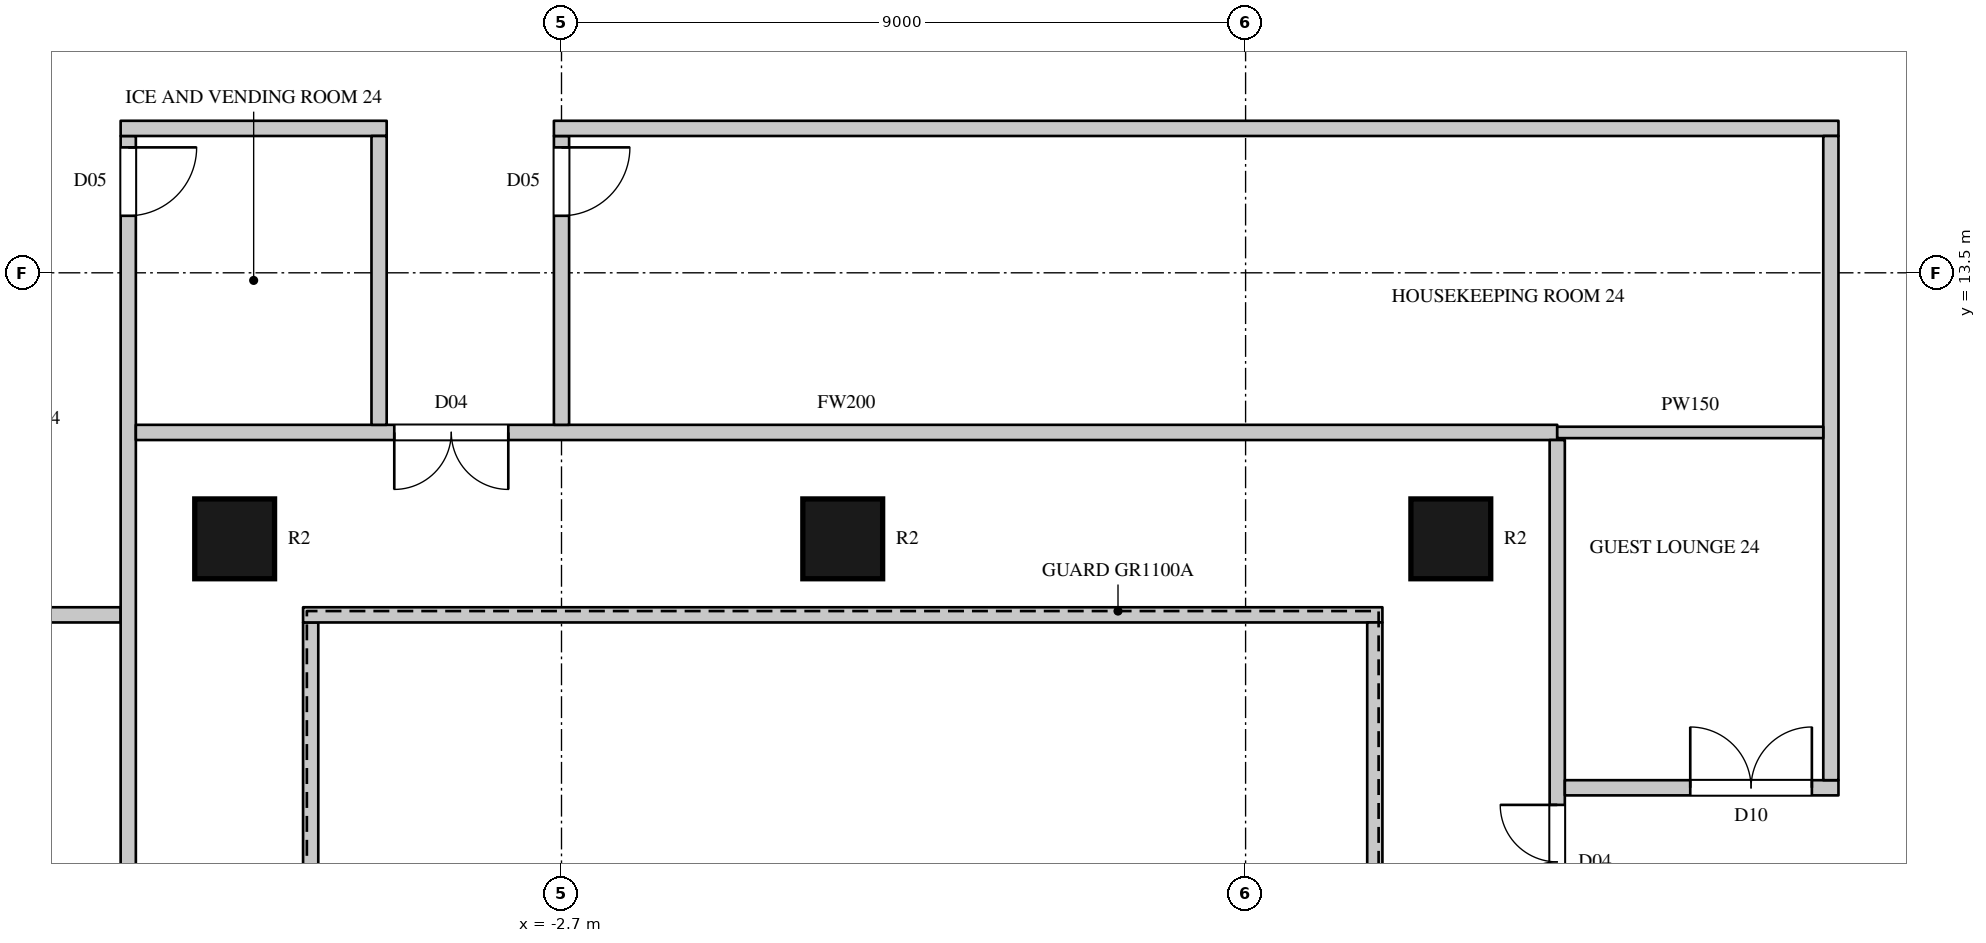
"""IFC4 building model, lengths in metres.
Left out: names, types, materials, properties, quantities, classifications, styles, units other than length and angle.
Written with IfcOpenShell. Run it as: python <this file> out.ifc"""

import sys

from ifc_helpers import new_model, si_unit, direction, frame, frame_2d, origin, origin_2d, place, context, subcontext, project, spatial, rectangle, circle, extrude, element, fill, save


model = new_model("IFC4")
c1 = context("Model", 3, precision=1e-05, world=origin(), true_north=direction((0.0, 1.0)))
c2 = subcontext(c1, "Body", "Model", "MODEL_VIEW")
j1 = project(units=[si_unit("LENGTHUNIT", "METRE"), si_unit("PLANEANGLEUNIT", "RADIAN")], contexts=[c1])
p1 = place(None, origin())
s1 = spatial("IfcSite", under=j1, at=p1, CompositionType="ELEMENT")
p2 = place(p1, origin())
s2 = spatial("IfcBuilding", under=s1, at=p2, CompositionType="ELEMENT")
p3 = place(p2, frame((0.0, 0.0, 116.7)))
s3 = spatial("IfcBuildingStorey", under=s2, at=p3, CompositionType="ELEMENT", Elevation=116.7)
for number, where, z_axis, x_axis in (
    (1, (-7.0, 10.0, 0.0), (0.0, 0.0, 1.0), (1.0, 0.0, 0.0)),
    (2, (1.0, 10.0, 0.0), (0.0, 0.0, 1.0), (1.0, 0.0, 0.0)),
    (3, (9.0, 10.0, 0.0), (0.0, 0.0, 1.0), (1.0, 0.0, 0.0)),
):
    element("IfcColumn", number, at=place(p3, frame(where, z_axis=z_axis, x_axis=x_axis)), inside=s3, PredefinedType="COLUMN", context=c2, shape_type="SweptSolid", body=[
        extrude(circle(Radius=0.525, at=origin_2d()), origin(), (0.0, 0.0, 1.0), 3.6),
    ])
p4 = place(p3, frame((-13.97, 9.0, 0.0), z_axis=(0.0, 0.0, 1.0), x_axis=(1.0, 0.0, 0.0)))
e4 = element("IfcWall", 4, at=p4, inside=s3, PredefinedType="PARTITIONING", context=c2, shape_type="SweptSolid", body=[
    extrude(rectangle(XDim=5.47, YDim=0.2, at=frame_2d((2.735, 0.0))), origin(), (0.0, 0.0, 1.0), 3.3),
])
p5 = place(p3, frame((-8.4, -11.3, 0.0), z_axis=(0.0, 0.0, 1.0), x_axis=(0.0, 1.0, 0.0)))
e5 = element("IfcWall", 5, at=p5, inside=s3, PredefinedType="PARTITIONING", context=c2, shape_type="SweptSolid", body=[
    extrude(rectangle(XDim=26.6, YDim=0.2, at=frame_2d((13.3, 0.0))), origin(), (0.0, 0.0, 1.0), 3.3),
])
p6 = place(p5, frame((15.05, 0.0, 0.0)))
e6 = element("IfcOpeningElement", 6, at=p6, cuts=e5, PredefinedType="OPENING", context=c2, shape_type="SweptSolid", body=[
    extrude(rectangle(XDim=1.5, YDim=2.2, at=frame_2d((0.75, 1.1))), frame((0.0, 0.11, 0.0), z_axis=(0.0, -1.0, 0.0), x_axis=(1.0, 0.0, 0.0)), (0.0, 0.0, 1.0), 0.22),
])
p7 = place(p5, frame((25.55, 0.0, 0.0)))
e7 = element("IfcOpeningElement", 7, at=p7, cuts=e5, PredefinedType="OPENING", context=c2, shape_type="SweptSolid", body=[
    extrude(rectangle(XDim=0.9, YDim=2.2, at=frame_2d((0.45, 1.1))), frame((0.0, 0.11, 0.0), z_axis=(0.0, -1.0, 0.0), x_axis=(1.0, 0.0, 0.0)), (0.0, 0.0, 1.0), 0.22),
])
p8 = place(p3, frame((-8.3, 11.4, 0.0), z_axis=(0.0, 0.0, 1.0), x_axis=(1.0, 0.0, 0.0)))
e8 = element("IfcWall", 8, at=p8, inside=s3, PredefinedType="PARTITIONING", context=c2, shape_type="SweptSolid", body=[
    extrude(rectangle(XDim=18.7, YDim=0.2, at=frame_2d((9.35, 0.0))), origin(), (0.0, 0.0, 1.0), 3.3),
])
p9 = place(p8, frame((3.4, 0.0, 0.0)))
e9 = element("IfcOpeningElement", 9, at=p9, cuts=e8, PredefinedType="OPENING", context=c2, shape_type="SweptSolid", body=[
    extrude(rectangle(XDim=1.5, YDim=2.2, at=frame_2d((0.75, 1.1))), frame((0.0, 0.11, 0.0), z_axis=(0.0, -1.0, 0.0), x_axis=(1.0, 0.0, 0.0)), (0.0, 0.0, 1.0), 0.22),
])
p10 = place(p3, frame((-8.5, 15.4, 0.0), z_axis=(0.0, 0.0, 1.0), x_axis=(1.0, 0.0, 0.0)))
e10 = element("IfcWall", 10, at=p10, inside=s3, PredefinedType="PARTITIONING", context=c2, shape_type="SweptSolid", body=[
    extrude(rectangle(XDim=3.5, YDim=0.2, at=frame_2d((1.75, 0.0))), origin(), (0.0, 0.0, 1.0), 3.3),
])
p11 = place(p3, frame((-6.0, -8.9, 0.0), z_axis=(0.0, 0.0, 1.0), x_axis=(0.0, 1.0, 0.0)))
e11 = element("IfcWall", 11, at=p11, inside=s3, PredefinedType="PARTITIONING", context=c2, shape_type="SweptSolid", body=[
    extrude(rectangle(XDim=17.8, YDim=0.2, at=frame_2d((8.9, 0.0))), origin(), (0.0, 0.0, 1.0), 3.3),
])
p12 = place(p3, frame((-6.1, 9.0, 0.0), z_axis=(0.0, 0.0, 1.0), x_axis=(1.0, 0.0, 0.0)))
e12 = element("IfcWall", 12, at=p12, inside=s3, PredefinedType="PARTITIONING", context=c2, shape_type="SweptSolid", body=[
    extrude(rectangle(XDim=14.2, YDim=0.2, at=frame_2d((7.1, 0.0))), origin(), (0.0, 0.0, 1.0), 3.3),
])
p13 = place(p3, frame((-5.1, 11.5, 0.0), z_axis=(0.0, 0.0, 1.0), x_axis=(0.0, 1.0, 0.0)))
e13 = element("IfcWall", 13, at=p13, inside=s3, PredefinedType="PARTITIONING", context=c2, shape_type="SweptSolid", body=[
    extrude(rectangle(XDim=3.8, YDim=0.2, at=frame_2d((1.9, 0.0))), origin(), (0.0, 0.0, 1.0), 3.3),
])
p14 = place(p3, frame((-2.7, 11.5, 0.0), z_axis=(0.0, 0.0, 1.0), x_axis=(0.0, 1.0, 0.0)))
e14 = element("IfcWall", 14, at=p14, inside=s3, PredefinedType="PARTITIONING", context=c2, shape_type="SweptSolid", body=[
    extrude(rectangle(XDim=3.8, YDim=0.2, at=frame_2d((1.9, 0.0))), origin(), (0.0, 0.0, 1.0), 2.75),
])
p15 = place(p14, frame((2.75, 0.0, 0.0)))
e15 = element("IfcOpeningElement", 15, at=p15, cuts=e14, PredefinedType="OPENING", context=c2, shape_type="SweptSolid", body=[
    extrude(rectangle(XDim=0.9, YDim=2.2, at=frame_2d((0.45, 1.1))), frame((0.0, 0.11, 0.0), z_axis=(0.0, -1.0, 0.0), x_axis=(1.0, 0.0, 0.0)), (0.0, 0.0, 1.0), 0.22),
])
p16 = place(p3, frame((-2.8, 15.4, 0.0), z_axis=(0.0, 0.0, 1.0), x_axis=(1.0, 0.0, 0.0)))
e16 = element("IfcWall", 16, at=p16, inside=s3, PredefinedType="PARTITIONING", context=c2, shape_type="SweptSolid", body=[
    extrude(rectangle(XDim=16.9, YDim=0.2, at=frame_2d((8.45, 0.0))), origin(), (0.0, 0.0, 1.0), 3.3),
])
p17 = place(p3, frame((8.0, -8.9, 0.0), z_axis=(0.0, 0.0, 1.0), x_axis=(0.0, 1.0, 0.0)))
e17 = element("IfcWall", 17, at=p17, inside=s3, PredefinedType="PARTITIONING", context=c2, shape_type="SweptSolid", body=[
    extrude(rectangle(XDim=17.8, YDim=0.2, at=frame_2d((8.9, 0.0))), origin(), (0.0, 0.0, 1.0), 3.3),
])
p18 = place(p3, frame((10.4, -11.3, 0.0), z_axis=(0.0, 0.0, 1.0), x_axis=(0.0, 1.0, 0.0)))
e18 = element("IfcWall", 18, at=p18, inside=s3, PredefinedType="PARTITIONING", context=c2, shape_type="SweptSolid", body=[
    extrude(rectangle(XDim=22.6, YDim=0.2, at=frame_2d((11.3, 0.0))), origin(), (0.0, 0.0, 1.0), 3.3),
])
p19 = place(p18, frame((16.3, 0.0, 0.0)))
e19 = element("IfcOpeningElement", 19, at=p19, cuts=e18, PredefinedType="OPENING", context=c2, shape_type="SweptSolid", body=[
    extrude(rectangle(XDim=1.5, YDim=2.2, at=frame_2d((0.75, 1.1))), frame((0.0, 0.11, 0.0), z_axis=(0.0, -1.0, 0.0), x_axis=(1.0, 0.0, 0.0)), (0.0, 0.0, 1.0), 0.22),
])
p20 = place(p18, frame((14.65, 0.0, 0.0)))
e20 = element("IfcOpeningElement", 20, at=p20, cuts=e18, PredefinedType="OPENING", context=c2, shape_type="SweptSolid", body=[
    extrude(rectangle(XDim=1.5, YDim=2.2, at=frame_2d((0.75, 1.1))), frame((0.0, 0.11, 0.0), z_axis=(0.0, -1.0, 0.0), x_axis=(1.0, 0.0, 0.0)), (0.0, 0.0, 1.0), 0.22),
])
p21 = place(p18, frame((11.95, 0.0, 0.0)))
e21 = element("IfcOpeningElement", 21, at=p21, cuts=e18, PredefinedType="OPENING", context=c2, shape_type="SweptSolid", body=[
    extrude(rectangle(XDim=1.5, YDim=2.2, at=frame_2d((0.75, 1.1))), frame((0.0, 0.11, 0.0), z_axis=(0.0, -1.0, 0.0), x_axis=(1.0, 0.0, 0.0)), (0.0, 0.0, 1.0), 0.22),
])
p22 = place(p3, frame((10.5, 6.725, 0.0), z_axis=(0.0, 0.0, 1.0), x_axis=(1.0, 0.0, 0.0)))
e22 = element("IfcWall", 22, at=p22, inside=s3, PredefinedType="PARTITIONING", context=c2, shape_type="SweptSolid", body=[
    extrude(rectangle(XDim=3.6, YDim=0.2, at=frame_2d((1.8, 0.0))), origin(), (0.0, 0.0, 1.0), 3.3),
])
p23 = place(p22, frame((1.65, 0.0, 0.0)))
e23 = element("IfcOpeningElement", 23, at=p23, cuts=e22, PredefinedType="OPENING", context=c2, shape_type="SweptSolid", body=[
    extrude(rectangle(XDim=1.6, YDim=2.4, at=frame_2d((0.8, 1.2))), frame((0.0, 0.11, 0.0), z_axis=(0.0, -1.0, 0.0), x_axis=(1.0, 0.0, 0.0)), (0.0, 0.0, 1.0), 0.22),
])
p24 = place(p3, frame((14.0, 6.825, 0.0), z_axis=(0.0, 0.0, 1.0), x_axis=(0.0, 1.0, 0.0)))
e24 = element("IfcWall", 24, at=p24, inside=s3, PredefinedType="PARTITIONING", context=c2, shape_type="SweptSolid", body=[
    extrude(rectangle(XDim=8.475, YDim=0.2, at=frame_2d((4.238, 0.0))), origin(), (0.0, 0.0, 1.0), 3.3),
])
p25 = place(p3, frame((10.4, 11.4, 0.0), z_axis=(0.0, 0.0, 1.0), x_axis=(1.0, 0.0, 0.0)))
e25 = element("IfcWall", 25, at=p25, inside=s3, PredefinedType="PARTITIONING", context=c2, shape_type="SweptSolid", body=[
    extrude(rectangle(XDim=3.5, YDim=0.15, at=frame_2d((1.75, 0.0))), origin(), (0.0, 0.0, 1.0), 3.3),
])
p26 = place(p9, origin())
e26 = element("IfcDoor", 26, at=p26, inside=s3, OperationType="DOUBLE_DOOR_SINGLE_SWING", PredefinedType="DOOR", context=c2, shape_type="SweptSolid", body=[
    extrude(rectangle(XDim=1.5, YDim=2.2, at=frame_2d((0.75, 1.1))), frame((0.0, 0.025, 0.0), z_axis=(0.0, -1.0, 0.0), x_axis=(1.0, 0.0, 0.0)), (0.0, 0.0, 1.0), 0.05),
])
fill(e9, e26)
p27 = place(p19, origin())
e27 = element("IfcDoor", 27, at=p27, inside=s3, OperationType="DOUBLE_DOOR_SINGLE_SWING", PredefinedType="DOOR", context=c2, shape_type="SweptSolid", body=[
    extrude(rectangle(XDim=1.5, YDim=2.2, at=frame_2d((0.75, 1.1))), frame((0.0, 0.025, 0.0), z_axis=(0.0, -1.0, 0.0), x_axis=(1.0, 0.0, 0.0)), (0.0, 0.0, 1.0), 0.05),
])
fill(e19, e27)
p28 = place(p7, origin())
e28 = element("IfcDoor", 28, at=p28, inside=s3, OperationType="SINGLE_SWING_LEFT", PredefinedType="DOOR", context=c2, shape_type="SweptSolid", body=[
    extrude(rectangle(XDim=0.9, YDim=2.2, at=frame_2d((0.45, 1.1))), frame((0.0, 0.025, 0.0), z_axis=(0.0, -1.0, 0.0), x_axis=(1.0, 0.0, 0.0)), (0.0, 0.0, 1.0), 0.05),
])
fill(e7, e28)
p29 = place(p15, origin())
e29 = element("IfcDoor", 29, at=p29, inside=s3, OperationType="SINGLE_SWING_LEFT", PredefinedType="DOOR", context=c2, shape_type="SweptSolid", body=[
    extrude(rectangle(XDim=0.9, YDim=2.2, at=frame_2d((0.45, 1.1))), frame((0.0, 0.025, 0.0), z_axis=(0.0, -1.0, 0.0), x_axis=(1.0, 0.0, 0.0)), (0.0, 0.0, 1.0), 0.05),
])
fill(e15, e29)
p30 = place(p23, origin())
e30 = element("IfcDoor", 30, at=p30, inside=s3, OperationType="DOUBLE_DOOR_SINGLE_SWING", PredefinedType="DOOR", context=c2, shape_type="SweptSolid", body=[
    extrude(rectangle(XDim=1.6, YDim=2.4, at=frame_2d((0.8, 1.2))), frame((0.0, 0.025, 0.0), z_axis=(0.0, -1.0, 0.0), x_axis=(1.0, 0.0, 0.0)), (0.0, 0.0, 1.0), 0.05),
])
fill(e23, e30)
save(model, sys.argv[1])
